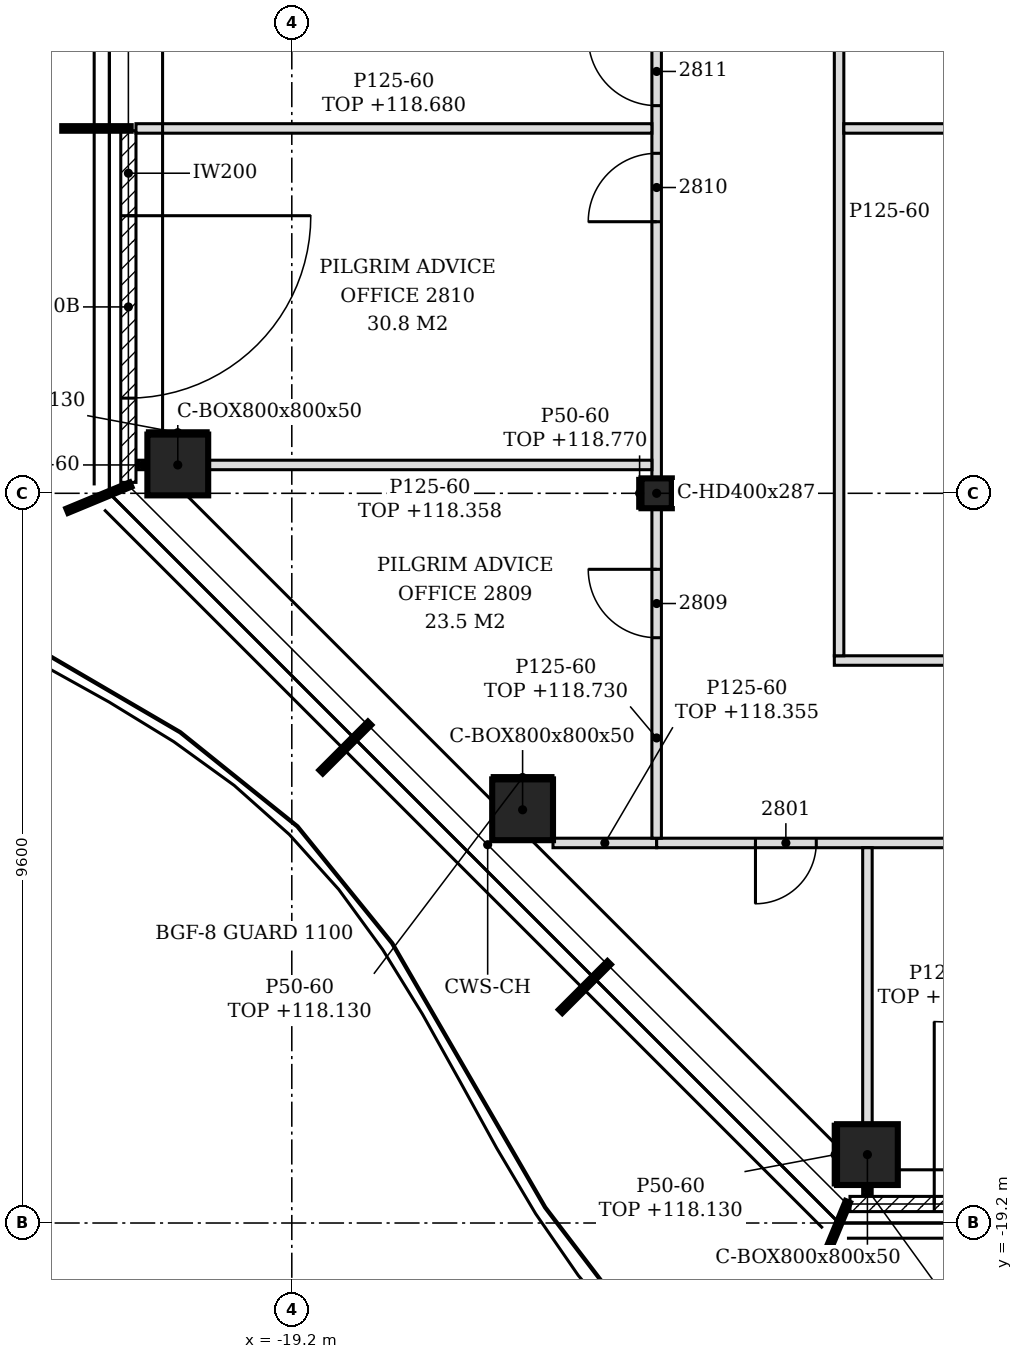
"""IFC4 building model, lengths in metres.
Left out: names, types, materials, properties, quantities, classifications, styles, units other than length and angle.
Written with IfcOpenShell. Run it as: python <this file> out.ifc"""

import sys

from ifc_helpers import new_model, si_unit, direction, frame, frame_2d, origin, origin_2d, place, context, subcontext, project, spatial, polyline, rectangle, hollow_rectangle, i_section, outline, extrude, clip, halfspace, element, fill, save


model = new_model("IFC4")
c1 = context("Model", 3, precision=1e-05, world=origin(), true_north=direction((0.0, 1.0)))
c2 = subcontext(c1, "Body", "Model", "MODEL_VIEW")
j1 = project(units=[si_unit("LENGTHUNIT", "METRE"), si_unit("PLANEANGLEUNIT", "RADIAN")], contexts=[c1])
p1 = place(None, origin())
s1 = spatial("IfcSite", under=j1, at=p1, CompositionType="ELEMENT")
p2 = place(p1, origin())
s2 = spatial("IfcBuilding", under=s1, at=p2, CompositionType="ELEMENT")
p3 = place(p2, frame((0.0, 0.0, 115.8)))
s3 = spatial("IfcBuildingStorey", under=s2, at=p3, CompositionType="ELEMENT", Elevation=115.8)
for number, where, z_axis, x_axis in (
    (1, (-11.627, -18.3, -0.15), (0.0, 0.0, 1.0), (1.0, 0.0, 0.0)),
    (2, (-20.7, -9.227, -0.15), (0.0, 0.0, 1.0), (1.0, 0.0, 0.0)),
    (3, (-16.164, -13.764, -0.15), (0.0, 0.0, 1.0), (1.0, 0.0, 0.0)),
):
    element("IfcColumn", number, at=place(p3, frame(where, z_axis=z_axis, x_axis=x_axis)), inside=s3, PredefinedType="COLUMN", context=c2, shape_type="Clipping", body=[
        clip(clip(extrude(hollow_rectangle(XDim=0.8, YDim=0.8, WallThickness=0.05, at=origin_2d()), origin(), (0.0, 0.0, 1.0), 3.5), halfspace(frame((0.0, 0.0, 0.021), z_axis=(0.0, 0.0, 1.0), x_axis=(1.0, 0.0, 0.0)), True)), halfspace(frame((0.0, 0.0, 3.05), z_axis=(0.0, 0.0, 1.0), x_axis=(1.0, 0.0, 0.0)), False)),
    ])
p4 = place(p3, frame((-14.4, -9.6, -0.15), z_axis=(0.0, 0.0, 1.0), x_axis=(1.0, 0.0, 0.0)))
e4 = element("IfcColumn", 4, at=p4, inside=s3, PredefinedType="COLUMN", context=c2, shape_type="SweptSolid", body=[
    extrude(i_section(OverallWidth=0.399, OverallDepth=0.393, WebThickness=0.023, FlangeThickness=0.037, FilletRadius=0.015, at=origin_2d()), origin(), (0.0, 0.0, 1.0), 3.5),
])
p5 = place(p3, frame((-11.856, -18.95, 0.0), z_axis=(0.0, 0.0, 1.0), x_axis=(1.0, 0.0, 0.0)))
e5 = element("IfcWall", 5, at=p5, inside=s3, PredefinedType="NOTDEFINED", context=c2, shape_type="SweptSolid", body=[
    extrude(rectangle(XDim=4.626, YDim=0.2, at=frame_2d((2.313, 0.0))), origin(), (0.0, 0.0, 1.0), 3.35),
])
p6 = place(p5, frame((1.108, 0.0, 0.0)))
e6 = element("IfcOpeningElement", 6, at=p6, cuts=e5, PredefinedType="OPENING", context=c2, shape_type="SweptSolid", body=[
    extrude(rectangle(XDim=2.4, YDim=2.4, at=frame_2d((1.2, 1.2))), frame((0.0, 0.11, 0.0), z_axis=(0.0, -1.0, 0.0), x_axis=(1.0, 0.0, 0.0)), (0.0, 0.0, 1.0), 0.22),
])
p7 = place(p3, frame((-21.35, -4.83, 0.0), z_axis=(0.0, 0.0, 1.0), x_axis=(0.0, -1.0, 0.0)))
e7 = element("IfcWall", 7, at=p7, inside=s3, PredefinedType="NOTDEFINED", context=c2, shape_type="SweptSolid", body=[
    extrude(rectangle(XDim=4.626, YDim=0.2, at=frame_2d((2.313, 0.0))), origin(), (0.0, 0.0, 1.0), 3.35),
])
p8 = place(p7, frame((1.118, 0.0, 0.0)))
e8 = element("IfcOpeningElement", 8, at=p8, cuts=e7, PredefinedType="OPENING", context=c2, shape_type="SweptSolid", body=[
    extrude(rectangle(XDim=2.4, YDim=2.4, at=frame_2d((1.2, 1.2))), frame((0.0, 0.11, 0.0), z_axis=(0.0, -1.0, 0.0), x_axis=(1.0, 0.0, 0.0)), (0.0, 0.0, 1.0), 0.22),
])
p9 = place(p3, frame((-11.627, -18.82, 0.0), z_axis=(0.0, 0.0, 1.0), x_axis=(0.0, 1.0, 0.0)))
e9 = element("IfcWall", 9, at=p9, inside=s3, PredefinedType="PARTITIONING", context=c2, shape_type="SweptSolid", body=[
    extrude(outline(polyline([(0.0, 0.0), (0.12, 0.0), (0.12, 2.467), (0.07, 2.467), (0.068, 3.35), (0.0, 3.35), (0.0, 0.0)])), frame((0.0, 0.062, 0.0), z_axis=(0.0, -1.0, 0.0), x_axis=(1.0, 0.0, 0.0)), (0.0, 0.0, 1.0), 0.125),
])
p10 = place(p3, frame((-11.627, -17.9, 0.0), z_axis=(0.0, 0.0, 1.0), x_axis=(0.0, 1.0, 0.0)))
e10 = element("IfcWall", 10, at=p10, inside=s3, PredefinedType="PARTITIONING", context=c2, shape_type="SweptSolid", body=[
    extrude(outline(polyline([(0.0, 0.0), (3.637, 0.0), (3.637, 2.558), (0.369, 2.558), (0.367, 2.33), (0.0, 2.33), (0.0, 0.0)])), frame((0.0, 0.062, 0.0), z_axis=(0.0, -1.0, 0.0), x_axis=(1.0, 0.0, 0.0)), (0.0, 0.0, 1.0), 0.125),
])
p11 = place(p3, frame((-15.764, -14.2, 0.0), z_axis=(0.0, 0.0, 1.0), x_axis=(1.0, 0.0, 0.0)))
e11 = element("IfcWall", 11, at=p11, inside=s3, PredefinedType="PARTITIONING", context=c2, shape_type="SweptSolid", body=[
    extrude(outline(polyline([(0.0, 0.0), (1.364, 0.0), (1.364, 2.555), (0.806, 2.555), (0.804, 2.33), (0.0, 2.33), (0.0, 0.0)])), frame((0.0, 0.062, 0.0), z_axis=(0.0, -1.0, 0.0), x_axis=(1.0, 0.0, 0.0)), (0.0, 0.0, 1.0), 0.125),
])
p12 = place(p3, frame((-14.4, -14.2, 0.0), z_axis=(0.0, 0.0, 1.0), x_axis=(1.0, 0.0, 0.0)))
e12 = element("IfcWall", 12, at=p12, inside=s3, PredefinedType="PARTITIONING", context=c2, shape_type="SweptSolid", body=[
    extrude(outline(polyline([(0.0, 0.0), (41.887, 0.0), (41.887, 3.35), (33.751, 3.35), (33.749, 2.322), (33.449, 2.322), (33.447, 3.35), (21.75, 3.35), (21.748, 2.83), (21.45, 2.83), (21.448, 3.35), (9.75, 3.35), (9.748, 2.83), (9.45, 2.83), (9.448, 3.35), (0.15, 3.35), (0.148, 2.93), (0.0, 2.93), (0.0, 0.0)])), frame((0.0, 0.062, 0.0), z_axis=(0.0, -1.0, 0.0), x_axis=(1.0, 0.0, 0.0)), (0.0, 0.0, 1.0), 0.125),
])
p13 = place(p12, frame((1.3, 0.0, 0.0)))
e13 = element("IfcOpeningElement", 13, at=p13, cuts=e12, PredefinedType="OPENING", context=c2, shape_type="SweptSolid", body=[
    extrude(rectangle(XDim=0.8, YDim=2.1, at=frame_2d((0.4, 1.05))), frame((0.0, 0.073, 0.0), z_axis=(0.0, -1.0, 0.0), x_axis=(1.0, 0.0, 0.0)), (0.0, 0.0, 1.0), 0.145),
])
p14 = place(p12, frame((6.0, 0.0, 0.0)))
e14 = element("IfcOpeningElement", 14, at=p14, cuts=e12, PredefinedType="OPENING", context=c2, shape_type="SweptSolid", body=[
    extrude(rectangle(XDim=0.9, YDim=2.1, at=frame_2d((0.45, 1.05))), frame((0.0, 0.073, 0.0), z_axis=(0.0, -1.0, 0.0), x_axis=(1.0, 0.0, 0.0)), (0.0, 0.0, 1.0), 0.145),
])
p15 = place(p12, frame((10.986, 0.0, 0.0)))
e15 = element("IfcOpeningElement", 15, at=p15, cuts=e12, PredefinedType="OPENING", context=c2, shape_type="SweptSolid", body=[
    extrude(rectangle(XDim=0.9, YDim=2.1, at=frame_2d((0.45, 1.05))), frame((0.0, 0.073, 0.0), z_axis=(0.0, -1.0, 0.0), x_axis=(1.0, 0.0, 0.0)), (0.0, 0.0, 1.0), 0.145),
])
p16 = place(p12, frame((15.6, 0.0, 0.0)))
e16 = element("IfcOpeningElement", 16, at=p16, cuts=e12, PredefinedType="OPENING", context=c2, shape_type="SweptSolid", body=[
    extrude(rectangle(XDim=0.9, YDim=2.1, at=frame_2d((0.45, 1.05))), frame((0.0, 0.073, 0.0), z_axis=(0.0, -1.0, 0.0), x_axis=(1.0, 0.0, 0.0)), (0.0, 0.0, 1.0), 0.145),
])
p17 = place(p12, frame((20.4, 0.0, 0.0)))
e17 = element("IfcOpeningElement", 17, at=p17, cuts=e12, PredefinedType="OPENING", context=c2, shape_type="SweptSolid", body=[
    extrude(rectangle(XDim=0.9, YDim=2.1, at=frame_2d((0.45, 1.05))), frame((0.0, 0.073, 0.0), z_axis=(0.0, -1.0, 0.0), x_axis=(1.0, 0.0, 0.0)), (0.0, 0.0, 1.0), 0.145),
])
p18 = place(p12, frame((23.4, 0.0, 0.0)))
e18 = element("IfcOpeningElement", 18, at=p18, cuts=e12, PredefinedType="OPENING", context=c2, shape_type="SweptSolid", body=[
    extrude(rectangle(XDim=0.9, YDim=2.1, at=frame_2d((0.45, 1.05))), frame((0.0, 0.073, 0.0), z_axis=(0.0, -1.0, 0.0), x_axis=(1.0, 0.0, 0.0)), (0.0, 0.0, 1.0), 0.145),
])
p19 = place(p12, frame((26.714, 0.0, 0.0)))
e19 = element("IfcOpeningElement", 19, at=p19, cuts=e12, PredefinedType="OPENING", context=c2, shape_type="SweptSolid", body=[
    extrude(rectangle(XDim=0.9, YDim=2.1, at=frame_2d((0.45, 1.05))), frame((0.0, 0.073, 0.0), z_axis=(0.0, -1.0, 0.0), x_axis=(1.0, 0.0, 0.0)), (0.0, 0.0, 1.0), 0.145),
])
p20 = place(p12, frame((31.6, 0.0, 0.0)))
e20 = element("IfcOpeningElement", 20, at=p20, cuts=e12, PredefinedType="OPENING", context=c2, shape_type="SweptSolid", body=[
    extrude(rectangle(XDim=0.9, YDim=2.1, at=frame_2d((0.45, 1.05))), frame((0.0, 0.073, 0.0), z_axis=(0.0, -1.0, 0.0), x_axis=(1.0, 0.0, 0.0)), (0.0, 0.0, 1.0), 0.145),
])
p21 = place(p12, frame((33.95, 0.0, 0.0)))
e21 = element("IfcOpeningElement", 21, at=p21, cuts=e12, PredefinedType="OPENING", context=c2, shape_type="SweptSolid", body=[
    extrude(rectangle(XDim=0.8, YDim=2.1, at=frame_2d((0.4, 1.05))), frame((0.0, 0.073, 0.0), z_axis=(0.0, -1.0, 0.0), x_axis=(1.0, 0.0, 0.0)), (0.0, 0.0, 1.0), 0.145),
])
p22 = place(p3, frame((-14.4, -14.137, 0.0), z_axis=(0.0, 0.0, 1.0), x_axis=(0.0, 1.0, 0.0)))
e22 = element("IfcWall", 22, at=p22, inside=s3, PredefinedType="PARTITIONING", context=c2, shape_type="SweptSolid", body=[
    extrude(rectangle(XDim=4.341, YDim=0.125, at=frame_2d((2.17, 0.0))), origin(), (0.0, 0.0, 1.0), 2.93),
])
p23 = place(p22, frame((2.637, 0.0, 0.0)))
e23 = element("IfcOpeningElement", 23, at=p23, cuts=e22, PredefinedType="OPENING", context=c2, shape_type="SweptSolid", body=[
    extrude(rectangle(XDim=0.9, YDim=2.1, at=frame_2d((0.45, 1.05))), frame((0.0, 0.073, 0.0), z_axis=(0.0, -1.0, 0.0), x_axis=(1.0, 0.0, 0.0)), (0.0, 0.0, 1.0), 0.145),
])
p24 = place(p3, frame((-12.062, -11.8, 0.0), z_axis=(0.0, 0.0, 1.0), x_axis=(1.0, 0.0, 0.0)))
e24 = element("IfcWall", 24, at=p24, inside=s3, PredefinedType="PARTITIONING", context=c2, shape_type="SweptSolid", body=[
    extrude(outline(polyline([(0.0, 0.0), (12.125, 0.0), (12.125, 3.35), (7.413, 3.35), (7.41, 2.83), (7.113, 2.83), (7.111, 3.35), (0.0, 3.35), (0.0, 0.0)])), frame((0.0, 0.062, 0.0), z_axis=(0.0, -1.0, 0.0), x_axis=(1.0, 0.0, 0.0)), (0.0, 0.0, 1.0), 0.125),
])
p25 = place(p24, frame((6.062, 0.0, 0.0)))
e25 = element("IfcOpeningElement", 25, at=p25, cuts=e24, PredefinedType="OPENING", context=c2, shape_type="SweptSolid", body=[
    extrude(rectangle(XDim=0.9, YDim=2.1, at=frame_2d((0.45, 1.05))), frame((0.0, 0.073, 0.0), z_axis=(0.0, -1.0, 0.0), x_axis=(1.0, 0.0, 0.0)), (0.0, 0.0, 1.0), 0.145),
])
p26 = place(p3, frame((-12.0, -11.738, 0.0), z_axis=(0.0, 0.0, 1.0), x_axis=(0.0, 1.0, 0.0)))
e26 = element("IfcWall", 26, at=p26, inside=s3, PredefinedType="PARTITIONING", context=c2, shape_type="SweptSolid", body=[
    extrude(outline(polyline([(0.0, 0.0), (11.675, 0.0), (11.675, 2.83), (11.637, 2.83), (11.635, 3.35), (7.038, 3.35), (7.035, 2.83), (6.837, 2.83), (6.835, 3.35), (2.238, 3.35), (2.236, 2.83), (2.038, 2.83), (2.035, 3.35), (0.0, 3.35), (0.0, 0.0)])), frame((0.0, 0.062, 0.0), z_axis=(0.0, -1.0, 0.0), x_axis=(1.0, 0.0, 0.0)), (0.0, 0.0, 1.0), 0.125),
])
p27 = place(p3, frame((-14.4, -9.404, 0.0), z_axis=(0.0, 0.0, 1.0), x_axis=(0.0, 1.0, 0.0)))
e27 = element("IfcWall", 27, at=p27, inside=s3, PredefinedType="PARTITIONING", context=c2, shape_type="SweptSolid", body=[
    extrude(rectangle(XDim=9.207, YDim=0.125, at=frame_2d((4.604, 0.0))), origin(), (0.0, 0.0, 1.0), 2.83),
])
p28 = place(p27, frame((3.376, 0.0, 0.0)))
e28 = element("IfcOpeningElement", 28, at=p28, cuts=e27, PredefinedType="OPENING", context=c2, shape_type="SweptSolid", body=[
    extrude(rectangle(XDim=0.9, YDim=2.1, at=frame_2d((0.45, 1.05))), frame((0.0, 0.073, 0.0), z_axis=(0.0, -1.0, 0.0), x_axis=(1.0, 0.0, 0.0)), (0.0, 0.0, 1.0), 0.145),
])
p29 = place(p27, frame((4.904, 0.0, 0.0)))
e29 = element("IfcOpeningElement", 29, at=p29, cuts=e27, PredefinedType="OPENING", context=c2, shape_type="SweptSolid", body=[
    extrude(rectangle(XDim=0.9, YDim=2.1, at=frame_2d((0.45, 1.05))), frame((0.0, 0.073, 0.0), z_axis=(0.0, -1.0, 0.0), x_axis=(1.0, 0.0, 0.0)), (0.0, 0.0, 1.0), 0.145),
])
p30 = place(p3, frame((-21.22, -9.227, 0.0), z_axis=(0.0, 0.0, 1.0), x_axis=(1.0, 0.0, 0.0)))
e30 = element("IfcWall", 30, at=p30, inside=s3, PredefinedType="PARTITIONING", context=c2, shape_type="SweptSolid", body=[
    extrude(outline(polyline([(0.0, 0.0), (0.12, 0.0), (0.12, 2.469), (0.07, 2.469), (0.068, 3.35), (0.0, 3.35), (0.0, 0.0)])), frame((0.0, 0.062, 0.0), z_axis=(0.0, -1.0, 0.0), x_axis=(1.0, 0.0, 0.0)), (0.0, 0.0, 1.0), 0.125),
])
p31 = place(p3, frame((-20.3, -9.227, 0.0), z_axis=(0.0, 0.0, 1.0), x_axis=(1.0, 0.0, 0.0)))
e31 = element("IfcWall", 31, at=p31, inside=s3, PredefinedType="PARTITIONING", context=c2, shape_type="SweptSolid", body=[
    extrude(outline(polyline([(0.0, 0.0), (5.838, 0.0), (5.837, 2.558), (0.369, 2.558), (0.367, 2.33), (0.0, 2.33), (0.0, 0.0)])), frame((0.0, 0.062, 0.0), z_axis=(0.0, -1.0, 0.0), x_axis=(1.0, 0.0, 0.0)), (0.0, 0.0, 1.0), 0.125),
])
p32 = place(p3, frame((-21.25, -4.8, 0.0), z_axis=(0.0, 0.0, 1.0), x_axis=(1.0, 0.0, 0.0)))
e32 = element("IfcWall", 32, at=p32, inside=s3, PredefinedType="PARTITIONING", context=c2, shape_type="SweptSolid", body=[
    extrude(outline(polyline([(0.0, 0.0), (6.788, 0.0), (6.788, 2.83), (6.7, 2.83), (6.698, 2.88), (1.05, 2.88), (1.048, 2.33), (0.05, 2.33), (0.048, 2.88), (0.0, 2.88), (0.0, 0.0)])), frame((0.0, 0.062, 0.0), z_axis=(0.0, -1.0, 0.0), x_axis=(1.0, 0.0, 0.0)), (0.0, 0.0, 1.0), 0.125),
])
p33 = place(p3, frame((-11.938, -4.8, 0.0), z_axis=(0.0, 0.0, 1.0), x_axis=(1.0, 0.0, 0.0)))
e33 = element("IfcWall", 33, at=p33, inside=s3, PredefinedType="PARTITIONING", context=c2, shape_type="SweptSolid", body=[
    extrude(outline(polyline([(0.0, 0.0), (7.075, 0.0), (7.075, 2.73), (6.988, 2.73), (6.986, 2.83), (0.0, 2.83), (0.0, 0.0)])), frame((0.0, 0.062, 0.0), z_axis=(0.0, -1.0, 0.0), x_axis=(1.0, 0.0, 0.0)), (0.0, 0.0, 1.0), 0.125),
])
for number, where, z_axis, x_axis in (
    (34, (-12.052, -18.7, 0.0), (0.0, 0.0, 1.0), (0.0, 1.0, 0.0)),
    (35, (-16.564, -13.339, 0.0), (0.0, 0.0, 1.0), (1.0, 0.0, 0.0)),
):
    element("IfcWall", number, at=place(p3, frame(where, z_axis=z_axis, x_axis=x_axis)), inside=s3, PredefinedType="PARTITIONING", context=c2, shape_type="SweptSolid", body=[
        extrude(rectangle(XDim=0.8, YDim=0.05, at=frame_2d((0.4, 0.0))), origin(), (0.0, 0.0, 1.0), 2.33),
    ])
p34 = place(p3, frame((-14.625, -9.796, 0.0), z_axis=(0.0, 0.0, 1.0), x_axis=(0.0, 1.0, 0.0)))
e36 = element("IfcWall", 36, at=p34, inside=s3, PredefinedType="PARTITIONING", context=c2, shape_type="SweptSolid", body=[
    extrude(rectangle(XDim=0.393, YDim=0.05, at=frame_2d((0.196, 0.0))), origin(), (0.0, 0.0, 1.0), 2.97),
])
p35 = place(p3, frame((-21.1, -8.802, 0.0), z_axis=(0.0, 0.0, 1.0), x_axis=(1.0, 0.0, 0.0)))
e37 = element("IfcWall", 37, at=p35, inside=s3, PredefinedType="PARTITIONING", context=c2, shape_type="SweptSolid", body=[
    extrude(rectangle(XDim=0.8, YDim=0.05, at=frame_2d((0.4, 0.0))), origin(), (0.0, 0.0, 1.0), 2.33),
])
p36 = place(p6, origin())
e38 = element("IfcDoor", 38, at=p36, inside=s3, OperationType="SINGLE_SWING_LEFT", PredefinedType="DOOR", context=c2, shape_type="SweptSolid", body=[
    extrude(rectangle(XDim=2.4, YDim=2.4, at=frame_2d((1.2, 1.2))), frame((0.0, 0.025, 0.0), z_axis=(0.0, -1.0, 0.0), x_axis=(1.0, 0.0, 0.0)), (0.0, 0.0, 1.0), 0.05),
])
fill(e6, e38)
p37 = place(p8, origin())
e39 = element("IfcDoor", 39, at=p37, inside=s3, OperationType="SINGLE_SWING_LEFT", PredefinedType="DOOR", context=c2, shape_type="SweptSolid", body=[
    extrude(rectangle(XDim=2.4, YDim=2.4, at=frame_2d((1.2, 1.2))), frame((0.0, 0.025, 0.0), z_axis=(0.0, -1.0, 0.0), x_axis=(1.0, 0.0, 0.0)), (0.0, 0.0, 1.0), 0.05),
])
fill(e8, e39)
p38 = place(p13, frame((0.8, 0.0, 0.0), z_axis=(0.0, 0.0, 1.0), x_axis=(-1.0, 0.0, 0.0)))
e40 = element("IfcDoor", 40, at=p38, inside=s3, OperationType="SINGLE_SWING_RIGHT", PredefinedType="DOOR", context=c2, shape_type="SweptSolid", body=[
    extrude(rectangle(XDim=0.8, YDim=2.1, at=frame_2d((0.4, 1.05))), frame((0.0, 0.025, 0.0), z_axis=(0.0, -1.0, 0.0), x_axis=(1.0, 0.0, 0.0)), (0.0, 0.0, 1.0), 0.05),
])
fill(e13, e40)
p39 = place(p23, origin())
e41 = element("IfcDoor", 41, at=p39, inside=s3, OperationType="SINGLE_SWING_RIGHT", PredefinedType="DOOR", context=c2, shape_type="SweptSolid", body=[
    extrude(rectangle(XDim=0.9, YDim=2.1, at=frame_2d((0.45, 1.05))), frame((0.0, 0.025, 0.0), z_axis=(0.0, -1.0, 0.0), x_axis=(1.0, 0.0, 0.0)), (0.0, 0.0, 1.0), 0.05),
])
fill(e23, e41)
p40 = place(p28, origin())
e42 = element("IfcDoor", 42, at=p40, inside=s3, OperationType="SINGLE_SWING_LEFT", PredefinedType="DOOR", context=c2, shape_type="SweptSolid", body=[
    extrude(rectangle(XDim=0.9, YDim=2.1, at=frame_2d((0.45, 1.05))), frame((0.0, 0.025, 0.0), z_axis=(0.0, -1.0, 0.0), x_axis=(1.0, 0.0, 0.0)), (0.0, 0.0, 1.0), 0.05),
])
fill(e28, e42)
p41 = place(p29, origin())
e43 = element("IfcDoor", 43, at=p41, inside=s3, OperationType="SINGLE_SWING_RIGHT", PredefinedType="DOOR", context=c2, shape_type="SweptSolid", body=[
    extrude(rectangle(XDim=0.9, YDim=2.1, at=frame_2d((0.45, 1.05))), frame((0.0, 0.025, 0.0), z_axis=(0.0, -1.0, 0.0), x_axis=(1.0, 0.0, 0.0)), (0.0, 0.0, 1.0), 0.05),
])
fill(e29, e43)
save(model, sys.argv[1])
